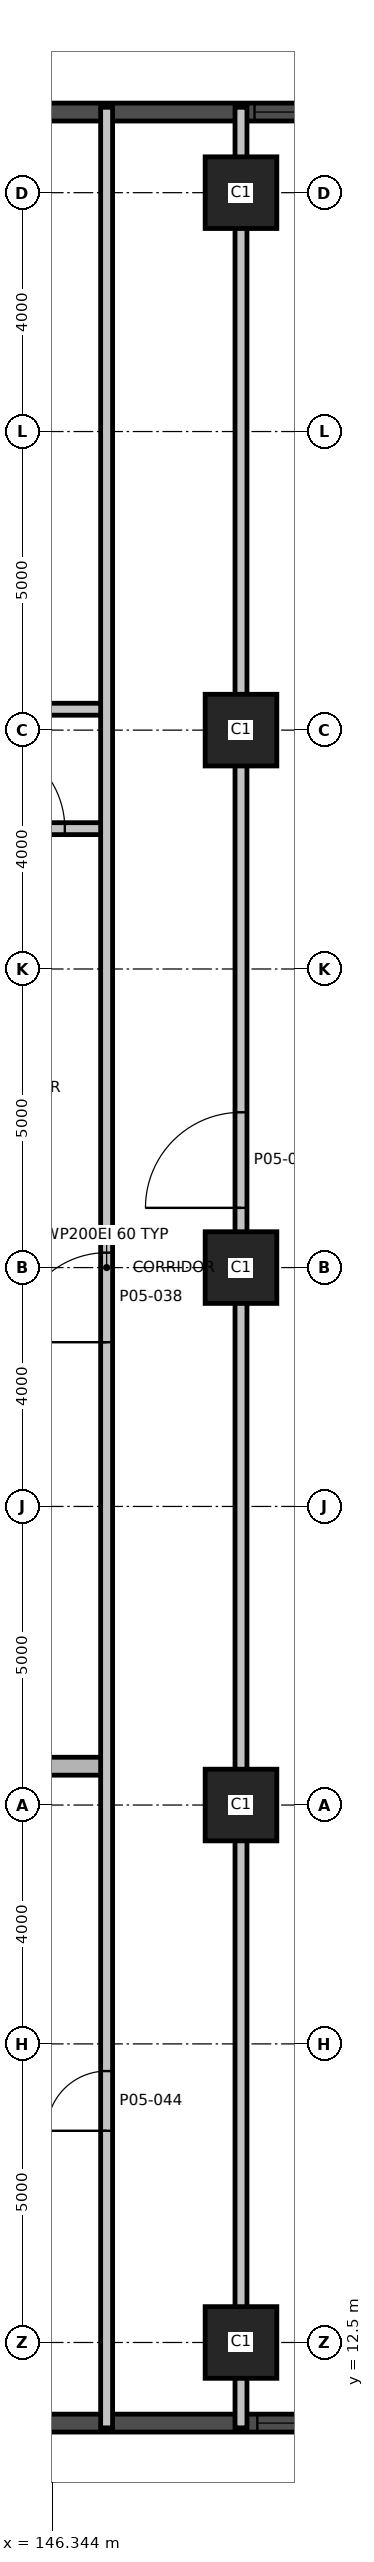
"""IFC4 building model, lengths in metres.
Left out: names, types, materials, properties, quantities, classifications, styles, units other than length and angle.
Written with IfcOpenShell. Run it as: python <this file> out.ifc"""

import sys

from ifc_helpers import new_model, si_unit, direction, frame, frame_2d, origin, origin_2d, place, context, subcontext, project, spatial, rectangle, extrude, element, fill, save


model = new_model("IFC4")
c1 = context("Model", 3, precision=1e-05, world=origin(), true_north=direction((0.0, 1.0)))
c2 = subcontext(c1, "Body", "Model", "MODEL_VIEW")
j1 = project(units=[si_unit("LENGTHUNIT", "METRE"), si_unit("PLANEANGLEUNIT", "RADIAN")], contexts=[c1])
p1 = place(None, origin())
s1 = spatial("IfcSite", under=j1, at=p1, CompositionType="ELEMENT")
p2 = place(p1, origin())
s2 = spatial("IfcBuilding", under=s1, at=p2, CompositionType="ELEMENT")
p3 = place(p2, frame((0.0, 0.0, 28.5)))
s3 = spatial("IfcBuildingStorey", under=s2, at=p3, CompositionType="ELEMENT", Elevation=28.5)
for number, where, z_axis, x_axis in (
    (1, (149.5, 12.5, 0.0), (0.0, 0.0, 1.0), (1.0, 0.0, 0.0)),
    (2, (149.5, 21.5, 0.0), (0.0, 0.0, 1.0), (1.0, 0.0, 0.0)),
    (3, (149.5, 30.5, 0.0), (0.0, 0.0, 1.0), (1.0, 0.0, 0.0)),
    (4, (149.5, 39.5, 0.0), (0.0, 0.0, 1.0), (1.0, 0.0, 0.0)),
    (5, (149.5, 48.5, 0.0), (0.0, 0.0, 1.0), (1.0, 0.0, 0.0)),
):
    element("IfcColumn", number, at=place(p3, frame(where, z_axis=z_axis, x_axis=x_axis)), inside=s3, PredefinedType="COLUMN", context=c2, shape_type="SweptSolid", body=[
        extrude(rectangle(XDim=1.2, YDim=1.2, at=origin_2d()), origin(), (0.0, 0.0, 1.0), 5.0),
    ])
p4 = place(p3, frame((118.048, 11.15, 0.0), z_axis=(0.0, 0.0, 1.0), x_axis=(1.0, 0.0, 0.0)))
e6 = element("IfcWall", 6, at=p4, inside=s3, PredefinedType="SOLIDWALL", context=c2, shape_type="SweptSolid", body=[
    extrude(rectangle(XDim=35.88, YDim=0.3, at=frame_2d((17.94, 0.0))), origin(), (0.0, 0.0, 1.0), 4.7),
])
p5 = place(p4, frame((4.202, 0.0, 0.9)))
e7 = element("IfcOpeningElement", 7, at=p5, cuts=e6, PredefinedType="OPENING", context=c2, shape_type="SweptSolid", body=[
    extrude(rectangle(XDim=3.0, YDim=2.4, at=frame_2d((1.5, 1.2))), frame((0.0, 0.16, 0.0), z_axis=(0.0, -1.0, 0.0), x_axis=(1.0, 0.0, 0.0)), (0.0, 0.0, 1.0), 0.32),
])
p6 = place(p4, frame((8.702, 0.0, 0.9)))
e8 = element("IfcOpeningElement", 8, at=p6, cuts=e6, PredefinedType="OPENING", context=c2, shape_type="SweptSolid", body=[
    extrude(rectangle(XDim=3.0, YDim=2.4, at=frame_2d((1.5, 1.2))), frame((0.0, 0.16, 0.0), z_axis=(0.0, -1.0, 0.0), x_axis=(1.0, 0.0, 0.0)), (0.0, 0.0, 1.0), 0.32),
])
p7 = place(p4, frame((17.702, 0.0, 0.9)))
e9 = element("IfcOpeningElement", 9, at=p7, cuts=e6, PredefinedType="OPENING", context=c2, shape_type="SweptSolid", body=[
    extrude(rectangle(XDim=3.0, YDim=2.4, at=frame_2d((1.5, 1.2))), frame((0.0, 0.16, 0.0), z_axis=(0.0, -1.0, 0.0), x_axis=(1.0, 0.0, 0.0)), (0.0, 0.0, 1.0), 0.32),
])
p8 = place(p4, frame((31.726, 0.0, 0.9)))
e10 = element("IfcOpeningElement", 10, at=p8, cuts=e6, PredefinedType="OPENING", context=c2, shape_type="SweptSolid", body=[
    extrude(rectangle(XDim=3.0, YDim=2.4, at=frame_2d((1.5, 1.2))), frame((0.0, 0.16, 0.0), z_axis=(0.0, -1.0, 0.0), x_axis=(1.0, 0.0, 0.0)), (0.0, 0.0, 1.0), 0.32),
])
p9 = place(p3, frame((153.952, 49.85, 0.0), z_axis=(0.0, 0.0, 1.0), x_axis=(-1.0, 0.0, 0.0)))
e11 = element("IfcWall", 11, at=p9, inside=s3, PredefinedType="SOLIDWALL", context=c2, shape_type="SweptSolid", body=[
    extrude(rectangle(XDim=35.88, YDim=0.3, at=frame_2d((17.94, 0.0))), origin(), (0.0, 0.0, 1.0), 4.7),
])
p10 = place(p9, frame((1.226, 0.0, 0.9)))
e12 = element("IfcOpeningElement", 12, at=p10, cuts=e11, PredefinedType="OPENING", context=c2, shape_type="SweptSolid", body=[
    extrude(rectangle(XDim=3.0, YDim=2.4, at=frame_2d((1.5, 1.2))), frame((0.0, 0.16, 0.0), z_axis=(0.0, -1.0, 0.0), x_axis=(1.0, 0.0, 0.0)), (0.0, 0.0, 1.0), 0.32),
])
p11 = place(p9, frame((10.702, 0.0, 0.9)))
e13 = element("IfcOpeningElement", 13, at=p11, cuts=e11, PredefinedType="OPENING", context=c2, shape_type="SweptSolid", body=[
    extrude(rectangle(XDim=3.0, YDim=2.4, at=frame_2d((1.5, 1.2))), frame((0.0, 0.16, 0.0), z_axis=(0.0, -1.0, 0.0), x_axis=(1.0, 0.0, 0.0)), (0.0, 0.0, 1.0), 0.32),
])
p12 = place(p9, frame((19.702, 0.0, 0.9)))
e14 = element("IfcOpeningElement", 14, at=p12, cuts=e11, PredefinedType="OPENING", context=c2, shape_type="SweptSolid", body=[
    extrude(rectangle(XDim=3.0, YDim=2.4, at=frame_2d((1.5, 1.2))), frame((0.0, 0.16, 0.0), z_axis=(0.0, -1.0, 0.0), x_axis=(1.0, 0.0, 0.0)), (0.0, 0.0, 1.0), 0.32),
])
p13 = place(p9, frame((24.202, 0.0, 0.9)))
e15 = element("IfcOpeningElement", 15, at=p13, cuts=e11, PredefinedType="OPENING", context=c2, shape_type="SweptSolid", body=[
    extrude(rectangle(XDim=3.0, YDim=2.4, at=frame_2d((1.5, 1.2))), frame((0.0, 0.16, 0.0), z_axis=(0.0, -1.0, 0.0), x_axis=(1.0, 0.0, 0.0)), (0.0, 0.0, 1.0), 0.32),
])
p14 = place(p9, frame((28.702, 0.0, 0.9)))
e16 = element("IfcOpeningElement", 16, at=p14, cuts=e11, PredefinedType="OPENING", context=c2, shape_type="SweptSolid", body=[
    extrude(rectangle(XDim=3.0, YDim=2.4, at=frame_2d((1.5, 1.2))), frame((0.0, 0.16, 0.0), z_axis=(0.0, -1.0, 0.0), x_axis=(1.0, 0.0, 0.0)), (0.0, 0.0, 1.0), 0.32),
])
p15 = place(p3, frame((125.75, 22.15, 0.0), z_axis=(0.0, 0.0, 1.0), x_axis=(1.0, 0.0, 0.0)))
e17 = element("IfcWall", 17, at=p15, inside=s3, PredefinedType="SHEAR", context=c2, shape_type="SweptSolid", body=[
    extrude(rectangle(XDim=21.5, YDim=0.3, at=frame_2d((10.75, 0.0))), origin(), (0.0, 0.0, 1.0), 3.8),
])
p16 = place(p15, frame((17.0, 0.0, 0.0)))
e18 = element("IfcOpeningElement", 18, at=p16, cuts=e17, PredefinedType="OPENING", context=c2, shape_type="SweptSolid", body=[
    extrude(rectangle(XDim=1.0, YDim=2.1, at=frame_2d((0.5, 1.05))), frame((0.0, 0.16, 0.0), z_axis=(0.0, -1.0, 0.0), x_axis=(1.0, 0.0, 0.0)), (0.0, 0.0, 1.0), 0.32),
])
p17 = place(p15, frame((3.064, 0.0, 0.0)))
e19 = element("IfcOpeningElement", 19, at=p17, cuts=e17, PredefinedType="OPENING", context=c2, shape_type="SweptSolid", body=[
    extrude(rectangle(XDim=1.0, YDim=2.1, at=frame_2d((0.5, 1.05))), frame((0.0, 0.16, 0.0), z_axis=(0.0, -1.0, 0.0), x_axis=(1.0, 0.0, 0.0)), (0.0, 0.0, 1.0), 0.32),
])
p18 = place(p15, frame((9.348, 0.0, 0.0)))
e20 = element("IfcOpeningElement", 20, at=p18, cuts=e17, PredefinedType="OPENING", context=c2, shape_type="SweptSolid", body=[
    extrude(rectangle(XDim=1.0, YDim=2.1, at=frame_2d((0.5, 1.05))), frame((0.0, 0.16, 0.0), z_axis=(0.0, -1.0, 0.0), x_axis=(1.0, 0.0, 0.0)), (0.0, 0.0, 1.0), 0.32),
])
p19 = place(p3, frame((144.02, 37.85, 0.0), z_axis=(0.0, 0.0, 1.0), x_axis=(1.0, 0.0, 0.0)))
e21 = element("IfcWall", 21, at=p19, inside=s3, PredefinedType="PARTITIONING", context=c2, shape_type="SweptSolid", body=[
    extrude(rectangle(XDim=3.23, YDim=0.2, at=frame_2d((1.615, 0.0))), origin(), (0.0, 0.0, 1.0), 3.8),
])
p20 = place(p19, frame((1.03, 0.0, 0.0)))
e22 = element("IfcOpeningElement", 22, at=p20, cuts=e21, PredefinedType="OPENING", context=c2, shape_type="SweptSolid", body=[
    extrude(rectangle(XDim=1.5, YDim=2.1, at=frame_2d((0.75, 1.05))), frame((0.0, 0.11, 0.0), z_axis=(0.0, -1.0, 0.0), x_axis=(1.0, 0.0, 0.0)), (0.0, 0.0, 1.0), 0.22),
])
p21 = place(p3, frame((143.0, 39.85, 0.0), z_axis=(0.0, 0.0, 1.0), x_axis=(1.0, 0.0, 0.0)))
e23 = element("IfcWall", 23, at=p21, inside=s3, PredefinedType="PARTITIONING", context=c2, shape_type="SweptSolid", body=[
    extrude(rectangle(XDim=4.25, YDim=0.2, at=frame_2d((2.125, 0.0))), origin(), (0.0, 0.0, 1.0), 3.8),
])
p22 = place(p3, frame((147.25, 11.07, 0.0), z_axis=(0.0, 0.0, 1.0), x_axis=(0.0, 1.0, 0.0)))
e24 = element("IfcWall", 24, at=p22, inside=s3, PredefinedType="PARTITIONING", context=c2, shape_type="SweptSolid", body=[
    extrude(rectangle(XDim=38.86, YDim=0.2, at=frame_2d((19.43, 0.0))), origin(), (0.0, 0.0, 1.0), 3.8),
])
p23 = place(p22, frame((18.18, 0.0, 0.0)))
e25 = element("IfcOpeningElement", 25, at=p23, cuts=e24, PredefinedType="OPENING", context=c2, shape_type="SweptSolid", body=[
    extrude(rectangle(XDim=1.5, YDim=2.1, at=frame_2d((0.75, 1.05))), frame((0.0, 0.11, 0.0), z_axis=(0.0, -1.0, 0.0), x_axis=(1.0, 0.0, 0.0)), (0.0, 0.0, 1.0), 0.22),
])
p24 = place(p22, frame((4.975, 0.0, 0.0)))
e26 = element("IfcOpeningElement", 26, at=p24, cuts=e24, PredefinedType="OPENING", context=c2, shape_type="SweptSolid", body=[
    extrude(rectangle(XDim=1.0, YDim=2.1, at=frame_2d((0.5, 1.05))), frame((0.0, 0.11, 0.0), z_axis=(0.0, -1.0, 0.0), x_axis=(1.0, 0.0, 0.0)), (0.0, 0.0, 1.0), 0.22),
])
p25 = place(p3, frame((149.5, 11.07, 0.0), z_axis=(0.0, 0.0, 1.0), x_axis=(0.0, 1.0, 0.0)))
e27 = element("IfcWall", 27, at=p25, inside=s3, PredefinedType="PARTITIONING", context=c2, shape_type="SweptSolid", body=[
    extrude(rectangle(XDim=38.86, YDim=0.2, at=frame_2d((19.43, 0.0))), origin(), (0.0, 0.0, 1.0), 3.8),
])
p26 = place(p25, frame((20.43, 0.0, 0.0)))
e28 = element("IfcOpeningElement", 28, at=p26, cuts=e27, PredefinedType="OPENING", context=c2, shape_type="SweptSolid", body=[
    extrude(rectangle(XDim=1.6, YDim=2.1, at=frame_2d((0.8, 1.05))), frame((0.0, 0.11, 0.0), z_axis=(0.0, -1.0, 0.0), x_axis=(1.0, 0.0, 0.0)), (0.0, 0.0, 1.0), 0.22),
])
p27 = place(p8, origin())
e29 = element("IfcWindow", 29, at=p27, inside=s3, PartitioningType="SINGLE_PANEL", PredefinedType="WINDOW", context=c2, shape_type="SweptSolid", body=[
    extrude(rectangle(XDim=3.0, YDim=2.4, at=frame_2d((1.5, 1.2))), frame((0.0, 0.03, 0.0), z_axis=(0.0, -1.0, 0.0), x_axis=(1.0, 0.0, 0.0)), (0.0, 0.0, 1.0), 0.06),
])
fill(e10, e29)
p28 = place(p10, origin())
e30 = element("IfcWindow", 30, at=p28, inside=s3, PartitioningType="SINGLE_PANEL", PredefinedType="WINDOW", context=c2, shape_type="SweptSolid", body=[
    extrude(rectangle(XDim=3.0, YDim=2.4, at=frame_2d((1.5, 1.2))), frame((0.0, 0.03, 0.0), z_axis=(0.0, -1.0, 0.0), x_axis=(1.0, 0.0, 0.0)), (0.0, 0.0, 1.0), 0.06),
])
fill(e12, e30)
p29 = place(p20, origin())
e31 = element("IfcDoor", 31, at=p29, inside=s3, OperationType="SINGLE_SWING_RIGHT", PredefinedType="DOOR", context=c2, shape_type="SweptSolid", body=[
    extrude(rectangle(XDim=1.5, YDim=2.1, at=frame_2d((0.75, 1.05))), frame((0.0, 0.025, 0.0), z_axis=(0.0, -1.0, 0.0), x_axis=(1.0, 0.0, 0.0)), (0.0, 0.0, 1.0), 0.05),
])
fill(e22, e31)
p30 = place(p23, origin())
e32 = element("IfcDoor", 32, at=p30, inside=s3, OperationType="SINGLE_SWING_RIGHT", PredefinedType="DOOR", context=c2, shape_type="SweptSolid", body=[
    extrude(rectangle(XDim=1.5, YDim=2.1, at=frame_2d((0.75, 1.05))), frame((0.0, 0.025, 0.0), z_axis=(0.0, -1.0, 0.0), x_axis=(1.0, 0.0, 0.0)), (0.0, 0.0, 1.0), 0.05),
])
fill(e25, e32)
p31 = place(p26, origin())
e33 = element("IfcDoor", 33, at=p31, inside=s3, OperationType="SINGLE_SWING_LEFT", PredefinedType="DOOR", context=c2, shape_type="SweptSolid", body=[
    extrude(rectangle(XDim=1.6, YDim=2.1, at=frame_2d((0.8, 1.05))), frame((0.0, 0.025, 0.0), z_axis=(0.0, -1.0, 0.0), x_axis=(1.0, 0.0, 0.0)), (0.0, 0.0, 1.0), 0.05),
])
fill(e28, e33)
p32 = place(p24, origin())
e34 = element("IfcDoor", 34, at=p32, inside=s3, OperationType="SINGLE_SWING_RIGHT", PredefinedType="DOOR", context=c2, shape_type="SweptSolid", body=[
    extrude(rectangle(XDim=1.0, YDim=2.1, at=frame_2d((0.5, 1.05))), frame((0.0, 0.025, 0.0), z_axis=(0.0, -1.0, 0.0), x_axis=(1.0, 0.0, 0.0)), (0.0, 0.0, 1.0), 0.05),
])
fill(e26, e34)
save(model, sys.argv[1])
